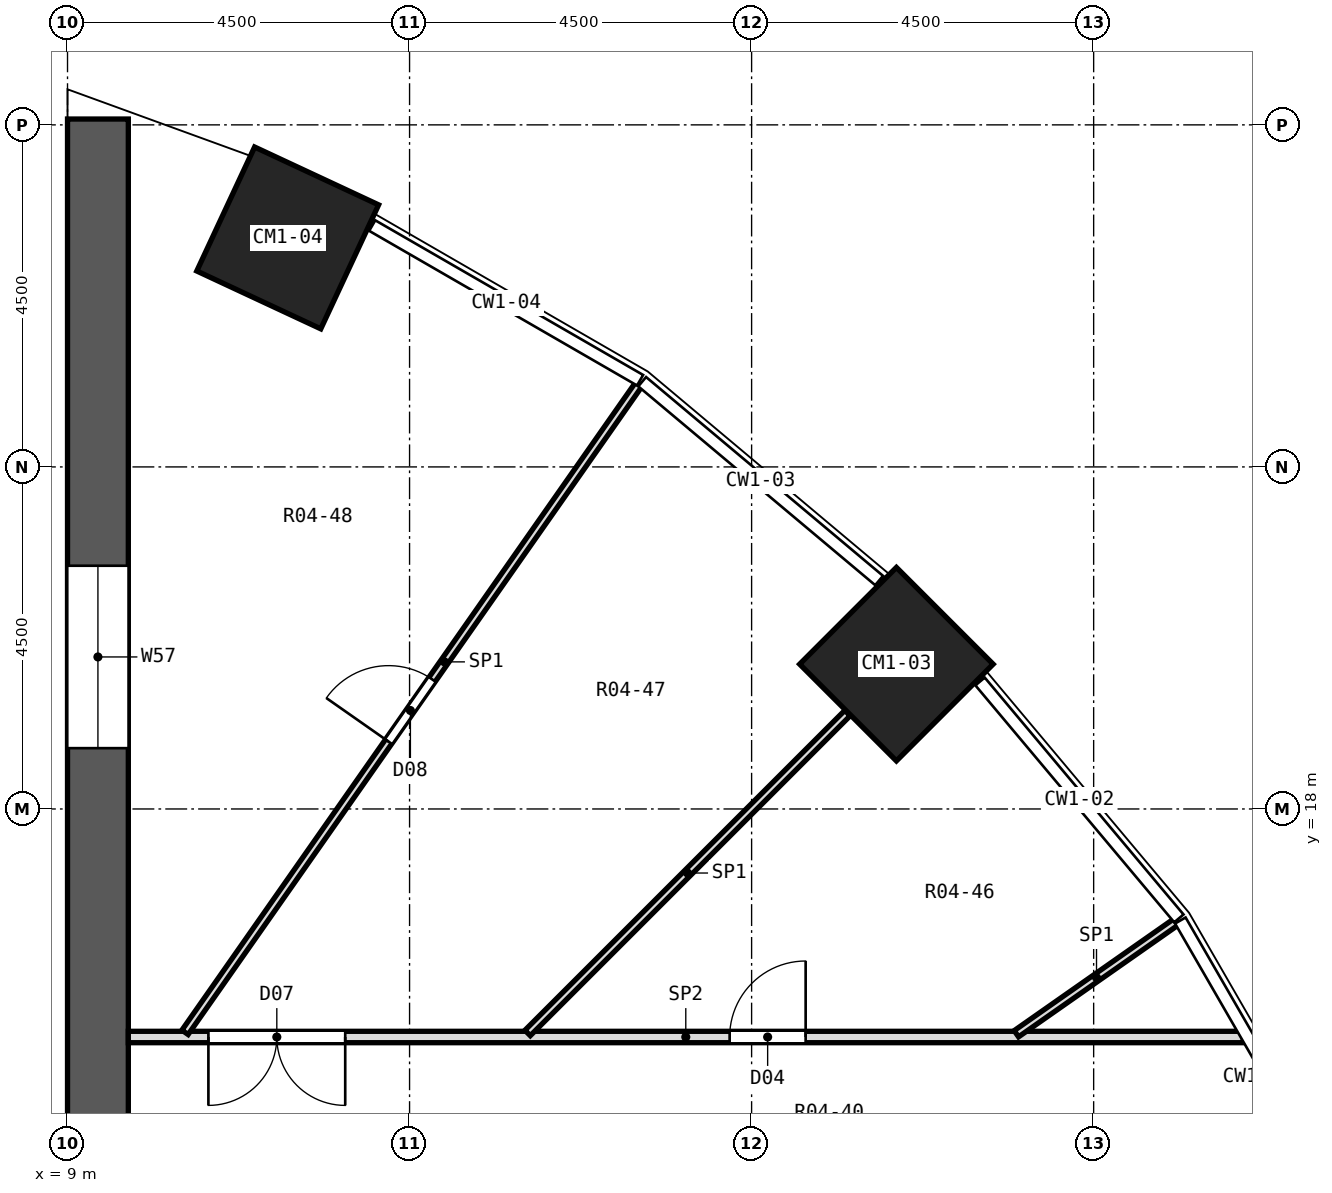
"""IFC4 building model, lengths in metres.
Left out: names, types, materials, properties, quantities, classifications, styles, units other than length and angle.
Written with IfcOpenShell. Run it as: python <this file> out.ifc"""

import sys

from ifc_helpers import new_model, si_unit, direction, frame, frame_2d, origin, origin_2d, place, context, subcontext, project, spatial, polyline, rectangle, outline, extrude, element, fill, save


model = new_model("IFC4")
c1 = context("Model", 3, precision=1e-05, world=origin(), true_north=direction((0.0, 1.0)))
c2 = subcontext(c1, "Body", "Model", "MODEL_VIEW")
j1 = project(units=[si_unit("LENGTHUNIT", "METRE"), si_unit("PLANEANGLEUNIT", "RADIAN")], contexts=[c1])
p1 = place(None, origin())
s1 = spatial("IfcSite", under=j1, at=p1, CompositionType="ELEMENT")
p2 = place(p1, origin())
s2 = spatial("IfcBuilding", under=s1, at=p2, CompositionType="ELEMENT")
p3 = place(p2, frame((0.0, 0.0, 5.0)))
s3 = spatial("IfcBuildingStorey", under=s2, at=p3, CompositionType="ELEMENT", Elevation=5.0)
for number, where, z_axis, x_axis in (
    (1, (19.905, 19.905, 0.0), (0.0, 0.0, 1.0), (0.707, 0.707, 0.0)),
    (2, (11.897, 25.512, 0.0), (0.0, 0.0, 1.0), (0.423, 0.906, 0.0)),
):
    element("IfcColumn", number, at=place(p3, frame(where, z_axis=z_axis, x_axis=x_axis)), inside=s3, PredefinedType="COLUMN", context=c2, shape_type="SweptSolid", body=[
        extrude(rectangle(XDim=1.8, YDim=1.8, at=origin_2d()), origin(), (0.0, 0.0, 1.0), 4.2),
    ])
p4 = place(p3, frame((9.4, -27.077, 0.0), z_axis=(0.0, 0.0, 1.0), x_axis=(0.0, 1.0, 0.0)))
e3 = element("IfcWall", 3, at=p4, inside=s3, PredefinedType="SHEAR", context=c2, shape_type="SweptSolid", body=[
    extrude(rectangle(XDim=54.154, YDim=0.8, at=frame_2d((27.077, 0.0))), origin(), (0.0, 0.0, 1.0), 4.2),
])
p5 = place(p4, frame((13.277, 0.0, 0.9)))
e4 = element("IfcOpeningElement", 4, at=p5, cuts=e3, PredefinedType="OPENING", context=c2, shape_type="SweptSolid", body=[
    extrude(rectangle(XDim=2.4, YDim=2.1, at=frame_2d((1.2, 1.05))), frame((0.0, 0.412, 0.0), z_axis=(0.0, -1.0, 0.0), x_axis=(1.0, 0.0, 0.0)), (0.0, 0.0, 1.0), 0.824),
])
p6 = place(p4, frame((17.877, 0.0, 0.9)))
e5 = element("IfcOpeningElement", 5, at=p6, cuts=e3, PredefinedType="OPENING", context=c2, shape_type="SweptSolid", body=[
    extrude(rectangle(XDim=2.4, YDim=2.1, at=frame_2d((1.2, 1.05))), frame((0.0, 0.412, 0.0), z_axis=(0.0, -1.0, 0.0), x_axis=(1.0, 0.0, 0.0)), (0.0, 0.0, 1.0), 0.824),
])
p7 = place(p4, frame((22.477, 0.0, 0.9)))
e6 = element("IfcOpeningElement", 6, at=p7, cuts=e3, PredefinedType="OPENING", context=c2, shape_type="SweptSolid", body=[
    extrude(rectangle(XDim=2.4, YDim=2.1, at=frame_2d((1.2, 1.05))), frame((0.0, 0.412, 0.0), z_axis=(0.0, -1.0, 0.0), x_axis=(1.0, 0.0, 0.0)), (0.0, 0.0, 1.0), 0.824),
])
p8 = place(p4, frame((29.277, 0.0, 0.9)))
e7 = element("IfcOpeningElement", 7, at=p8, cuts=e3, PredefinedType="OPENING", context=c2, shape_type="SweptSolid", body=[
    extrude(rectangle(XDim=2.4, YDim=2.1, at=frame_2d((1.2, 1.05))), frame((0.0, 0.412, 0.0), z_axis=(0.0, -1.0, 0.0), x_axis=(1.0, 0.0, 0.0)), (0.0, 0.0, 1.0), 0.824),
])
p9 = place(p4, frame((33.877, 0.0, 0.9)))
e8 = element("IfcOpeningElement", 8, at=p9, cuts=e3, PredefinedType="OPENING", context=c2, shape_type="SweptSolid", body=[
    extrude(rectangle(XDim=2.4, YDim=2.1, at=frame_2d((1.2, 1.05))), frame((0.0, 0.412, 0.0), z_axis=(0.0, -1.0, 0.0), x_axis=(1.0, 0.0, 0.0)), (0.0, 0.0, 1.0), 0.824),
])
p10 = place(p4, frame((38.477, 0.0, 0.9)))
e9 = element("IfcOpeningElement", 9, at=p10, cuts=e3, PredefinedType="OPENING", context=c2, shape_type="SweptSolid", body=[
    extrude(rectangle(XDim=2.4, YDim=2.1, at=frame_2d((1.2, 1.05))), frame((0.0, 0.412, 0.0), z_axis=(0.0, -1.0, 0.0), x_axis=(1.0, 0.0, 0.0)), (0.0, 0.0, 1.0), 0.824),
])
p11 = place(p4, frame((5.877, 0.0, 0.9)))
e10 = element("IfcOpeningElement", 10, at=p11, cuts=e3, PredefinedType="OPENING", context=c2, shape_type="SweptSolid", body=[
    extrude(rectangle(XDim=2.4, YDim=2.1, at=frame_2d((1.2, 1.05))), frame((0.0, 0.412, 0.0), z_axis=(0.0, -1.0, 0.0), x_axis=(1.0, 0.0, 0.0)), (0.0, 0.0, 1.0), 0.824),
])
p12 = place(p4, frame((45.877, 0.0, 0.9)))
e11 = element("IfcOpeningElement", 11, at=p12, cuts=e3, PredefinedType="OPENING", context=c2, shape_type="SweptSolid", body=[
    extrude(rectangle(XDim=2.4, YDim=2.1, at=frame_2d((1.2, 1.05))), frame((0.0, 0.412, 0.0), z_axis=(0.0, -1.0, 0.0), x_axis=(1.0, 0.0, 0.0)), (0.0, 0.0, 1.0), 0.824),
])
p13 = place(p3, frame((11.637, 26.498, 0.0), z_axis=(0.342010332624, 0.939694078188, 0.001992936543), x_axis=(-0.000670333127, -0.001876857341, 0.999998014028)))
e12 = element("IfcWall", 12, at=p13, inside=s3, PredefinedType="SOLIDWALL", context=c2, shape_type="SweptSolid", body=[
    extrude(outline(polyline([(0.0, 0.0), (3.65, -2.507e-19), (3.65, -2.81), (4.2, -2.81), (4.2, -3.171), (3.191, -2.977), (2.098, -2.852), (1.0, -2.81), (-3.344e-05, -2.81), (0.0, 0.0)])), origin(), (0.0, 0.0, -1.0), 0.38),
])
p14 = place(p3, frame((9.8, 15.0, 0.0), z_axis=(0.0, 0.0, 1.0), x_axis=(1.0, 0.0, 0.0)))
e13 = element("IfcWall", 13, at=p14, inside=s3, PredefinedType="PARTITIONING", context=c2, shape_type="SweptSolid", body=[
    extrude(rectangle(XDim=14.668, YDim=0.15, at=frame_2d((7.334, 0.0))), origin(), (0.0, 0.0, 1.0), 3.65),
])
p15 = place(p14, frame((7.911, 0.0, 0.0)))
e14 = element("IfcOpeningElement", 14, at=p15, cuts=e13, PredefinedType="OPENING", context=c2, shape_type="SweptSolid", body=[
    extrude(rectangle(XDim=1.0, YDim=2.1, at=frame_2d((0.5, 1.05))), frame((0.0, 0.087, 0.0), z_axis=(0.0, -1.0, 0.0), x_axis=(1.0, 0.0, 0.0)), (0.0, 0.0, 1.0), 0.174),
])
p16 = place(p14, frame((1.053, 0.0, 0.0)))
e15 = element("IfcOpeningElement", 15, at=p16, cuts=e13, PredefinedType="OPENING", context=c2, shape_type="SweptSolid", body=[
    extrude(rectangle(XDim=1.8, YDim=2.1, at=frame_2d((0.9, 1.05))), frame((0.0, 0.087, 0.0), z_axis=(0.0, -1.0, 0.0), x_axis=(1.0, 0.0, 0.0)), (0.0, 0.0, 1.0), 0.174),
])
p17 = place(p3, frame((21.483, 15.043, 0.0), z_axis=(0.0, 0.0, 1.0), x_axis=(0.819102633098, 0.573646996376, 0.0)))
e16 = element("IfcWall", 16, at=p17, inside=s3, PredefinedType="PARTITIONING", context=c2, shape_type="SweptSolid", body=[
    extrude(rectangle(XDim=2.573, YDim=0.1, at=frame_2d((1.287, 0.0))), origin(), (0.0, 0.0, 1.0), 3.65),
])
p18 = place(p3, frame((15.053, 15.053, 0.0), z_axis=(0.0, 0.0, 1.0), x_axis=(0.707106781187, 0.707106781187, 0.0)))
e17 = element("IfcWall", 17, at=p18, inside=s3, PredefinedType="PARTITIONING", context=c2, shape_type="SweptSolid", body=[
    extrude(rectangle(XDim=5.952, YDim=0.1, at=frame_2d((2.976, 0.0))), origin(), (0.0, 0.0, 1.0), 3.65),
])
p19 = place(p3, frame((10.546, 15.061, 0.0), z_axis=(0.0, 0.0, 1.0), x_axis=(0.573610244327, 0.819128370649, 0.0)))
e18 = element("IfcWall", 18, at=p19, inside=s3, PredefinedType="PARTITIONING", context=c2, shape_type="SweptSolid", body=[
    extrude(rectangle(XDim=10.413, YDim=0.1, at=frame_2d((5.207, 0.0))), origin(), (0.0, 0.0, 1.0), 3.65),
])
p20 = place(p19, frame((4.669, 0.0, 0.0)))
e19 = element("IfcOpeningElement", 19, at=p20, cuts=e18, PredefinedType="OPENING", context=c2, shape_type="SweptSolid", body=[
    extrude(rectangle(XDim=1.0, YDim=2.1, at=frame_2d((0.5, 1.05))), frame((0.0, 0.062, 0.0), z_axis=(0.0, -1.0, 0.0), x_axis=(1.0, 0.0, 0.0)), (0.0, 0.0, 1.0), 0.124),
])
p21 = place(p15, origin())
e20 = element("IfcDoor", 20, at=p21, inside=s3, OperationType="SINGLE_SWING_RIGHT", PredefinedType="DOOR", context=c2, shape_type="SweptSolid", body=[
    extrude(rectangle(XDim=1.0, YDim=2.1, at=frame_2d((0.5, 1.05))), frame((0.0, 0.025, 0.0), z_axis=(0.0, -1.0, 0.0), x_axis=(1.0, 0.0, 0.0)), (0.0, 0.0, 1.0), 0.05),
])
fill(e14, e20)
p22 = place(p16, frame((1.8, 0.0, 0.0), z_axis=(0.0, 0.0, 1.0), x_axis=(-1.0, 0.0, 0.0)))
e21 = element("IfcDoor", 21, at=p22, inside=s3, OperationType="DOUBLE_DOOR_SINGLE_SWING", PredefinedType="DOOR", context=c2, shape_type="SweptSolid", body=[
    extrude(rectangle(XDim=1.8, YDim=2.1, at=frame_2d((0.9, 1.05))), frame((0.0, 0.025, 0.0), z_axis=(0.0, -1.0, 0.0), x_axis=(1.0, 0.0, 0.0)), (0.0, 0.0, 1.0), 0.05),
])
fill(e15, e21)
p23 = place(p20, origin())
e22 = element("IfcDoor", 22, at=p23, inside=s3, OperationType="SINGLE_SWING_LEFT", PredefinedType="DOOR", context=c2, shape_type="SweptSolid", body=[
    extrude(rectangle(XDim=1.0, YDim=2.1, at=frame_2d((0.5, 1.05))), frame((0.0, 0.025, 0.0), z_axis=(0.0, -1.0, 0.0), x_axis=(1.0, 0.0, 0.0)), (0.0, 0.0, 1.0), 0.05),
])
fill(e19, e22)
p24 = place(p12, origin())
e23 = element("IfcWindow", 23, at=p24, inside=s3, PartitioningType="SINGLE_PANEL", PredefinedType="WINDOW", context=c2, shape_type="SweptSolid", body=[
    extrude(rectangle(XDim=2.4, YDim=2.1, at=frame_2d((1.2, 1.05))), frame((0.0, 0.03, 0.0), z_axis=(0.0, -1.0, 0.0), x_axis=(1.0, 0.0, 0.0)), (0.0, 0.0, 1.0), 0.06),
])
fill(e11, e23)
save(model, sys.argv[1])
